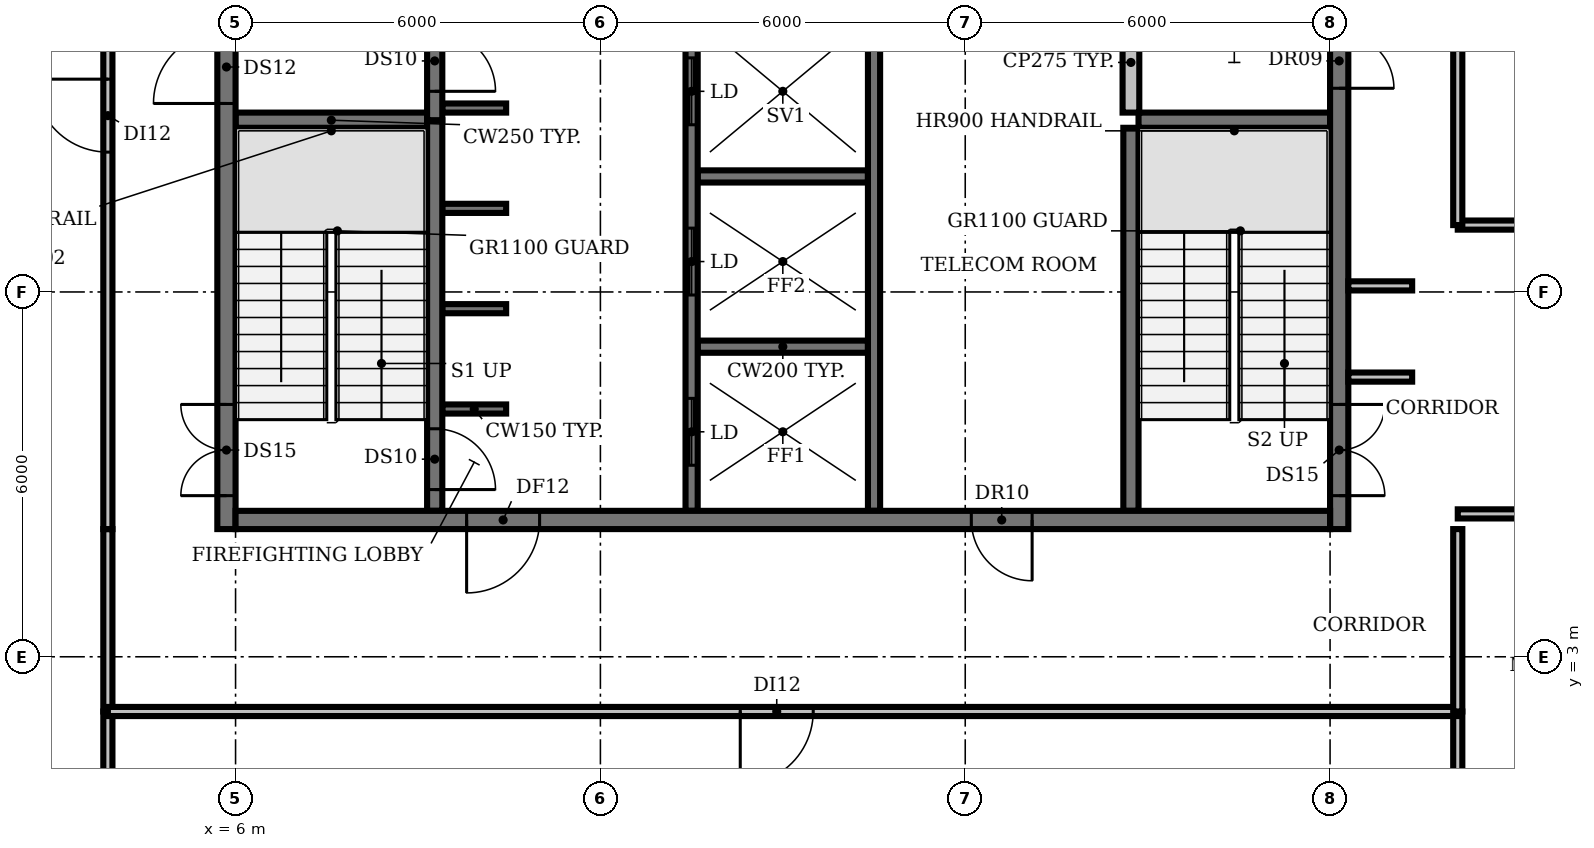
"""IFC4 building model, lengths in metres.
Left out: names, types, materials, properties, quantities, classifications, styles, units other than length and angle.
Written with IfcOpenShell. Run it as: python <this file> out.ifc"""

import sys

from ifc_helpers import new_model, si_unit, direction, frame, frame_2d, origin, place, context, subcontext, project, spatial, rectangle, extrude, element, fill, save


model = new_model("IFC4")
c1 = context("Model", 3, precision=1e-05, world=origin(), true_north=direction((0.0, 1.0)))
c2 = subcontext(c1, "Body", "Model", "MODEL_VIEW")
j1 = project(units=[si_unit("LENGTHUNIT", "METRE"), si_unit("PLANEANGLEUNIT", "RADIAN")], contexts=[c1])
p1 = place(None, origin())
s1 = spatial("IfcSite", under=j1, at=p1, CompositionType="ELEMENT")
p2 = place(p1, origin())
s2 = spatial("IfcBuilding", under=s1, at=p2, CompositionType="ELEMENT")
p3 = place(p2, frame((0.0, 0.0, 323.0)))
s3 = spatial("IfcBuildingStorey", under=s2, at=p3, CompositionType="ELEMENT", Elevation=323.0)
p4 = place(p3, frame((9.4, 7.075, 0.0), z_axis=(0.0, 0.0, 1.0), x_axis=(1.0, 0.0, 0.0)))
e1 = element("IfcWall", 1, at=p4, inside=s3, PredefinedType="SHEAR", context=c2, shape_type="SweptSolid", body=[
    extrude(rectangle(XDim=1.05, YDim=0.15, at=frame_2d((0.525, 0.0))), origin(), (0.0, 0.0, 1.0), 3.9),
])
p5 = place(p3, frame((13.6, 8.1, 0.0), z_axis=(0.0, 0.0, 1.0), x_axis=(1.0, 0.0, 0.0)))
e2 = element("IfcWall", 2, at=p5, inside=s3, PredefinedType="SHEAR", context=c2, shape_type="SweptSolid", body=[
    extrude(rectangle(XDim=2.8, YDim=0.2, at=frame_2d((1.4, 0.0))), origin(), (0.0, 0.0, 1.0), 3.9),
])
for number, where, z_axis, x_axis in (
    (3, (9.4, 8.725, 0.0), (0.0, 0.0, 1.0), (1.0, 0.0, 0.0)),
    (4, (9.4, 10.375, 0.0), (0.0, 0.0, 1.0), (1.0, 0.0, 0.0)),
):
    element("IfcWall", number, at=place(p3, frame(where, z_axis=z_axis, x_axis=x_axis)), inside=s3, PredefinedType="SHEAR", context=c2, shape_type="SweptSolid", body=[
        extrude(rectangle(XDim=1.05, YDim=0.15, at=frame_2d((0.525, 0.0))), origin(), (0.0, 0.0, 1.0), 3.9),
    ])
p6 = place(p3, frame((13.6, 10.9, 0.0), z_axis=(0.0, 0.0, 1.0), x_axis=(1.0, 0.0, 0.0)))
e5 = element("IfcWall", 5, at=p6, inside=s3, PredefinedType="SHEAR", context=c2, shape_type="SweptSolid", body=[
    extrude(rectangle(XDim=2.8, YDim=0.2, at=frame_2d((1.4, 0.0))), origin(), (0.0, 0.0, 1.0), 3.9),
])
for number, where, z_axis, x_axis in (
    (6, (6.0, 11.825, 0.0), (0.0, 0.0, 1.0), (1.0, 0.0, 0.0)),
    (7, (20.85, 11.825, 0.0), (0.0, 0.0, 1.0), (1.0, 0.0, 0.0)),
):
    element("IfcWall", number, at=place(p3, frame(where, z_axis=z_axis, x_axis=x_axis)), inside=s3, PredefinedType="SHEAR", context=c2, shape_type="SweptSolid", body=[
        extrude(rectangle(XDim=3.15, YDim=0.25, at=frame_2d((1.575, 0.0))), origin(), (0.0, 0.0, 1.0), 3.9),
    ])
p7 = place(p3, frame((9.4, 12.025, 0.0), z_axis=(0.0, 0.0, 1.0), x_axis=(1.0, 0.0, 0.0)))
e8 = element("IfcWall", 8, at=p7, inside=s3, PredefinedType="SHEAR", context=c2, shape_type="SweptSolid", body=[
    extrude(rectangle(XDim=1.05, YDim=0.15, at=frame_2d((0.525, 0.0))), origin(), (0.0, 0.0, 1.0), 3.9),
])
p8 = place(p3, frame((9.275, 11.825, 0.0), z_axis=(0.0, 0.0, 1.0), x_axis=(0.0, -1.0, 0.0)))
e9 = element("IfcWall", 9, at=p8, inside=s3, PredefinedType="SHEAR", context=c2, shape_type="SweptSolid", body=[
    extrude(rectangle(XDim=6.425, YDim=0.25, at=frame_2d((3.212, 0.0))), origin(), (0.0, 0.0, 1.0), 3.9),
])
p9 = place(p8, frame((5.075, 0.0, 0.0)))
e10 = element("IfcOpeningElement", 10, at=p9, cuts=e9, PredefinedType="OPENING", context=c2, shape_type="SweptSolid", body=[
    extrude(rectangle(XDim=1.0, YDim=2.1, at=frame_2d((0.5, 1.05))), frame((0.0, 0.135, 0.0), z_axis=(0.0, -1.0, 0.0), x_axis=(1.0, 0.0, 0.0)), (0.0, 0.0, 1.0), 0.27),
])
p10 = place(p3, frame((9.275, 18.375, 0.0), z_axis=(0.0, 0.0, 1.0), x_axis=(0.0, -1.0, 0.0)))
e11 = element("IfcWall", 11, at=p10, inside=s3, PredefinedType="SHEAR", context=c2, shape_type="SweptSolid", body=[
    extrude(rectangle(XDim=6.55, YDim=0.25, at=frame_2d((3.275, 0.0))), origin(), (0.0, 0.0, 1.0), 3.9),
])
p11 = place(p10, frame((5.075, 0.0, 0.0)))
e12 = element("IfcOpeningElement", 12, at=p11, cuts=e11, PredefinedType="OPENING", context=c2, shape_type="SweptSolid", body=[
    extrude(rectangle(XDim=1.0, YDim=2.1, at=frame_2d((0.5, 1.05))), frame((0.0, 0.135, 0.0), z_axis=(0.0, -1.0, 0.0), x_axis=(1.0, 0.0, 0.0)), (0.0, 0.0, 1.0), 0.27),
])
p12 = place(p3, frame((13.5, 5.4, 0.0), z_axis=(0.0, 0.0, 1.0), x_axis=(0.0, 1.0, 0.0)))
e13 = element("IfcWall", 13, at=p12, inside=s3, PredefinedType="SHEAR", context=c2, shape_type="SweptSolid", body=[
    extrude(rectangle(XDim=8.2, YDim=0.2, at=frame_2d((4.1, 0.0))), origin(), (0.0, 0.0, 1.0), 3.9),
])
p13 = place(p12, frame((0.75, 0.0, 0.0)))
e14 = element("IfcOpeningElement", 14, at=p13, cuts=e13, PredefinedType="OPENING", context=c2, shape_type="SweptSolid", body=[
    extrude(rectangle(XDim=1.1, YDim=2.1, at=frame_2d((0.55, 1.05))), frame((0.0, 0.11, 0.0), z_axis=(0.0, -1.0, 0.0), x_axis=(1.0, 0.0, 0.0)), (0.0, 0.0, 1.0), 0.22),
])
p14 = place(p12, frame((3.55, 0.0, 0.0)))
e15 = element("IfcOpeningElement", 15, at=p14, cuts=e13, PredefinedType="OPENING", context=c2, shape_type="SweptSolid", body=[
    extrude(rectangle(XDim=1.1, YDim=2.1, at=frame_2d((0.55, 1.05))), frame((0.0, 0.11, 0.0), z_axis=(0.0, -1.0, 0.0), x_axis=(1.0, 0.0, 0.0)), (0.0, 0.0, 1.0), 0.22),
])
p15 = place(p12, frame((6.35, 0.0, 0.0)))
e16 = element("IfcOpeningElement", 16, at=p15, cuts=e13, PredefinedType="OPENING", context=c2, shape_type="SweptSolid", body=[
    extrude(rectangle(XDim=1.1, YDim=2.1, at=frame_2d((0.55, 1.05))), frame((0.0, 0.11, 0.0), z_axis=(0.0, -1.0, 0.0), x_axis=(1.0, 0.0, 0.0)), (0.0, 0.0, 1.0), 0.22),
])
p16 = place(p3, frame((16.5, 5.4, 0.0), z_axis=(0.0, 0.0, 1.0), x_axis=(0.0, 1.0, 0.0)))
e17 = element("IfcWall", 17, at=p16, inside=s3, PredefinedType="SHEAR", context=c2, shape_type="SweptSolid", body=[
    extrude(rectangle(XDim=8.2, YDim=0.2, at=frame_2d((4.1, 0.0))), origin(), (0.0, 0.0, 1.0), 3.9),
])
p17 = place(p3, frame((20.725, 5.4, 0.0), z_axis=(0.0, 0.0, 1.0), x_axis=(0.0, 1.0, 0.0)))
e18 = element("IfcWall", 18, at=p17, inside=s3, PredefinedType="SHEAR", context=c2, shape_type="SweptSolid", body=[
    extrude(rectangle(XDim=6.3, YDim=0.25, at=frame_2d((3.15, 0.0))), origin(), (0.0, 0.0, 1.0), 3.9),
])
p18 = place(p3, frame((20.725, 11.95, 0.0), z_axis=(0.0, 0.0, 1.0), x_axis=(0.0, 1.0, 0.0)))
e19 = element("IfcWall", 19, at=p18, inside=s3, PredefinedType="PARTITIONING", context=c2, shape_type="SweptSolid", body=[
    extrude(rectangle(XDim=1.65, YDim=0.275, at=frame_2d((0.825, 0.0))), origin(), (0.0, 0.0, 1.0), 3.9),
])
p19 = place(p3, frame((5.85, 5.1, 0.0), z_axis=(0.0, 0.0, 1.0), x_axis=(0.0, 1.0, 0.0)))
e20 = element("IfcWall", 20, at=p19, inside=s3, PredefinedType="SHEAR", context=c2, shape_type="SweptSolid", body=[
    extrude(rectangle(XDim=20.0, YDim=0.3, at=frame_2d((10.0, 0.0))), origin(), (0.0, 0.0, 1.0), 3.9),
])
p20 = place(p19, frame((0.55, 0.0, 0.0)))
e21 = element("IfcOpeningElement", 21, at=p20, cuts=e20, PredefinedType="OPENING", context=c2, shape_type="SweptSolid", body=[
    extrude(rectangle(XDim=1.5, YDim=2.1, at=frame_2d((0.75, 1.05))), frame((0.0, 0.16, 0.0), z_axis=(0.0, -1.0, 0.0), x_axis=(1.0, 0.0, 0.0)), (0.0, 0.0, 1.0), 0.32),
])
p21 = place(p19, frame((7.0, 0.0, 0.0)))
e22 = element("IfcOpeningElement", 22, at=p21, cuts=e20, PredefinedType="OPENING", context=c2, shape_type="SweptSolid", body=[
    extrude(rectangle(XDim=1.2, YDim=2.1, at=frame_2d((0.6, 1.05))), frame((0.0, 0.16, 0.0), z_axis=(0.0, -1.0, 0.0), x_axis=(1.0, 0.0, 0.0)), (0.0, 0.0, 1.0), 0.32),
])
p22 = place(p19, frame((13.55, 0.0, 0.0)))
e23 = element("IfcOpeningElement", 23, at=p22, cuts=e20, PredefinedType="OPENING", context=c2, shape_type="SweptSolid", body=[
    extrude(rectangle(XDim=1.2, YDim=2.1, at=frame_2d((0.6, 1.05))), frame((0.0, 0.16, 0.0), z_axis=(0.0, -1.0, 0.0), x_axis=(1.0, 0.0, 0.0)), (0.0, 0.0, 1.0), 0.32),
])
p23 = place(p3, frame((24.15, 25.705, 0.0), z_axis=(0.0, 0.0, 1.0), x_axis=(0.0, -1.0, 0.0)))
e24 = element("IfcWall", 24, at=p23, inside=s3, PredefinedType="SHEAR", context=c2, shape_type="SweptSolid", body=[
    extrude(rectangle(XDim=20.605, YDim=0.3, at=frame_2d((10.302, 0.0))), origin(), (0.0, 0.0, 1.0), 3.9),
])
p24 = place(p23, frame((18.555, 0.0, 0.0)))
e25 = element("IfcOpeningElement", 25, at=p24, cuts=e24, PredefinedType="OPENING", context=c2, shape_type="SweptSolid", body=[
    extrude(rectangle(XDim=1.5, YDim=2.1, at=frame_2d((0.75, 1.05))), frame((0.0, 0.16, 0.0), z_axis=(0.0, -1.0, 0.0), x_axis=(1.0, 0.0, 0.0)), (0.0, 0.0, 1.0), 0.32),
])
p25 = place(p23, frame((12.455, 0.0, 0.0)))
e26 = element("IfcOpeningElement", 26, at=p25, cuts=e24, PredefinedType="OPENING", context=c2, shape_type="SweptSolid", body=[
    extrude(rectangle(XDim=0.9, YDim=2.1, at=frame_2d((0.45, 1.05))), frame((0.0, 0.16, 0.0), z_axis=(0.0, -1.0, 0.0), x_axis=(1.0, 0.0, 0.0)), (0.0, 0.0, 1.0), 0.32),
])
p26 = place(p23, frame((6.455, 0.0, 0.0)))
e27 = element("IfcOpeningElement", 27, at=p26, cuts=e24, PredefinedType="OPENING", context=c2, shape_type="SweptSolid", body=[
    extrude(rectangle(XDim=2.0, YDim=2.1, at=frame_2d((1.0, 1.05))), frame((0.0, 0.16, 0.0), z_axis=(0.0, -1.0, 0.0), x_axis=(1.0, 0.0, 0.0)), (0.0, 0.0, 1.0), 0.32),
])
p27 = place(p3, frame((24.0, 5.25, 0.0), z_axis=(0.0, 0.0, 1.0), x_axis=(-1.0, 0.0, 0.0)))
e28 = element("IfcWall", 28, at=p27, inside=s3, PredefinedType="SHEAR", context=c2, shape_type="SweptSolid", body=[
    extrude(rectangle(XDim=18.0, YDim=0.3, at=frame_2d((9.0, 0.0))), origin(), (0.0, 0.0, 1.0), 3.9),
])
p28 = place(p27, frame((13.0, 0.0, 0.0)))
e29 = element("IfcOpeningElement", 29, at=p28, cuts=e28, PredefinedType="OPENING", context=c2, shape_type="SweptSolid", body=[
    extrude(rectangle(XDim=1.2, YDim=2.1, at=frame_2d((0.6, 1.05))), frame((0.0, 0.16, 0.0), z_axis=(0.0, -1.0, 0.0), x_axis=(1.0, 0.0, 0.0)), (0.0, 0.0, 1.0), 0.32),
])
p29 = place(p27, frame((4.9, 0.0, 0.0)))
e30 = element("IfcOpeningElement", 30, at=p29, cuts=e28, PredefinedType="OPENING", context=c2, shape_type="SweptSolid", body=[
    extrude(rectangle(XDim=1.0, YDim=2.1, at=frame_2d((0.5, 1.05))), frame((0.0, 0.16, 0.0), z_axis=(0.0, -1.0, 0.0), x_axis=(1.0, 0.0, 0.0)), (0.0, 0.0, 1.0), 0.32),
])
p30 = place(p3, frame((3.9, -3.29, 0.0), z_axis=(0.0, 0.0, 1.0), x_axis=(0.0, 1.0, 0.0)))
e31 = element("IfcWall", 31, at=p30, inside=s3, PredefinedType="PARTITIONING", context=c2, shape_type="SweptSolid", body=[
    extrude(rectangle(XDim=5.39, YDim=0.15, at=frame_2d((2.695, 0.0))), origin(), (0.0, 0.0, 1.0), 2.48),
])
p31 = place(p3, frame((3.9, 2.1, 0.0), z_axis=(0.0, 0.0, 1.0), x_axis=(0.0, 1.0, 0.0)))
e32 = element("IfcWall", 32, at=p31, inside=s3, PredefinedType="PARTITIONING", context=c2, shape_type="SweptSolid", body=[
    extrude(rectangle(XDim=3.0, YDim=0.15, at=frame_2d((1.5, 0.0))), origin(), (0.0, 0.0, 1.0), 2.48),
])
p32 = place(p3, frame((3.9, 5.1, 0.0), z_axis=(0.0, 0.0, 1.0), x_axis=(0.0, 1.0, 0.0)))
e33 = element("IfcWall", 33, at=p32, inside=s3, PredefinedType="PARTITIONING", context=c2, shape_type="SweptSolid", body=[
    extrude(rectangle(XDim=13.9, YDim=0.15, at=frame_2d((6.95, 0.0))), origin(), (0.0, 0.0, 1.0), 2.48),
])
p33 = place(p32, frame((6.2, 0.0, 0.0)))
e34 = element("IfcOpeningElement", 34, at=p33, cuts=e33, PredefinedType="OPENING", context=c2, shape_type="SweptSolid", body=[
    extrude(rectangle(XDim=1.2, YDim=2.1, at=frame_2d((0.6, 1.05))), frame((0.0, 0.085, 0.0), z_axis=(0.0, -1.0, 0.0), x_axis=(1.0, 0.0, 0.0)), (0.0, 0.0, 1.0), 0.17),
])
for number, where, z_axis, x_axis in (
    (35, (24.3, 7.6, 0.0), (0.0, 0.0, 1.0), (1.0, 0.0, 0.0)),
    (36, (24.3, 9.1, 0.0), (0.0, 0.0, 1.0), (1.0, 0.0, 0.0)),
):
    element("IfcWall", number, at=place(p3, frame(where, z_axis=z_axis, x_axis=x_axis)), inside=s3, PredefinedType="PARTITIONING", context=c2, shape_type="SweptSolid", body=[
        extrude(rectangle(XDim=1.05, YDim=0.15, at=frame_2d((0.525, 0.0))), origin(), (0.0, 0.0, 1.0), 2.48),
    ])
p34 = place(p3, frame((26.1, -3.96, 0.0), z_axis=(0.0, 0.0, 1.0), x_axis=(0.0, 1.0, 0.0)))
e37 = element("IfcWall", 37, at=p34, inside=s3, PredefinedType="PARTITIONING", context=c2, shape_type="SweptSolid", body=[
    extrude(rectangle(XDim=6.06, YDim=0.15, at=frame_2d((3.03, 0.0))), origin(), (0.0, 0.0, 1.0), 2.48),
])
p35 = place(p3, frame((26.1, 2.1, 0.0), z_axis=(0.0, 0.0, 1.0), x_axis=(-1.0, 0.0, 0.0)))
e38 = element("IfcWall", 38, at=p35, inside=s3, PredefinedType="PARTITIONING", context=c2, shape_type="SweptSolid", body=[
    extrude(rectangle(XDim=22.2, YDim=0.15, at=frame_2d((11.1, 0.0))), origin(), (0.0, 0.0, 1.0), 2.48),
])
p36 = place(p35, frame((10.6, 0.0, 0.0)))
e39 = element("IfcOpeningElement", 39, at=p36, cuts=e38, PredefinedType="OPENING", context=c2, shape_type="SweptSolid", body=[
    extrude(rectangle(XDim=1.2, YDim=2.1, at=frame_2d((0.6, 1.05))), frame((0.0, 0.085, 0.0), z_axis=(0.0, -1.0, 0.0), x_axis=(1.0, 0.0, 0.0)), (0.0, 0.0, 1.0), 0.17),
])
p37 = place(p3, frame((26.1, 2.1, 0.0), z_axis=(0.0, 0.0, 1.0), x_axis=(0.0, 1.0, 0.0)))
e40 = element("IfcWall", 40, at=p37, inside=s3, PredefinedType="PARTITIONING", context=c2, shape_type="SweptSolid", body=[
    extrude(rectangle(XDim=3.0, YDim=0.15, at=frame_2d((1.5, 0.0))), origin(), (0.0, 0.0, 1.0), 2.48),
])
p38 = place(p3, frame((26.1, 10.1, 0.0), z_axis=(0.0, 0.0, 1.0), x_axis=(1.0, 0.0, 0.0)))
e41 = element("IfcWall", 41, at=p38, inside=s3, PredefinedType="PARTITIONING", context=c2, shape_type="SweptSolid", body=[
    extrude(rectangle(XDim=1.11, YDim=0.15, at=frame_2d((0.555, 0.0))), origin(), (0.0, 0.0, 1.0), 2.48),
])
p39 = place(p3, frame((26.1, 19.924, 0.0), z_axis=(0.0, 0.0, 1.0), x_axis=(0.0, -1.0, 0.0)))
e42 = element("IfcWall", 42, at=p39, inside=s3, PredefinedType="PARTITIONING", context=c2, shape_type="SweptSolid", body=[
    extrude(rectangle(XDim=9.823, YDim=0.15, at=frame_2d((4.912, 0.0))), origin(), (0.0, 0.0, 1.0), 2.48),
])
p40 = place(p39, frame((4.724, 0.0, 0.0)))
e43 = element("IfcOpeningElement", 43, at=p40, cuts=e42, PredefinedType="OPENING", context=c2, shape_type="SweptSolid", body=[
    extrude(rectangle(XDim=1.0, YDim=2.1, at=frame_2d((0.5, 1.05))), frame((0.0, 0.085, 0.0), z_axis=(0.0, -1.0, 0.0), x_axis=(1.0, 0.0, 0.0)), (0.0, 0.0, 1.0), 0.17),
])
p41 = place(p3, frame((31.75, 5.35, 0.0), z_axis=(0.0, 0.0, 1.0), x_axis=(-1.0, 0.0, 0.0)))
e44 = element("IfcWall", 44, at=p41, inside=s3, PredefinedType="PARTITIONING", context=c2, shape_type="SweptSolid", body=[
    extrude(rectangle(XDim=5.65, YDim=0.15, at=frame_2d((2.825, 0.0))), origin(), (0.0, 0.0, 1.0), 2.48),
])
p42 = place(p41, frame((2.95, 0.0, 0.0)))
e45 = element("IfcOpeningElement", 45, at=p42, cuts=e44, PredefinedType="OPENING", context=c2, shape_type="SweptSolid", body=[
    extrude(rectangle(XDim=1.0, YDim=2.1, at=frame_2d((0.5, 1.05))), frame((0.0, 0.085, 0.0), z_axis=(0.0, -1.0, 0.0), x_axis=(1.0, 0.0, 0.0)), (0.0, 0.0, 1.0), 0.17),
])
p43 = place(p9, origin())
e46 = element("IfcDoor", 46, at=p43, inside=s3, OperationType="SINGLE_SWING_RIGHT", PredefinedType="DOOR", context=c2, shape_type="SweptSolid", body=[
    extrude(rectangle(XDim=1.0, YDim=2.1, at=frame_2d((0.5, 1.05))), frame((0.0, 0.025, 0.0), z_axis=(0.0, -1.0, 0.0), x_axis=(1.0, 0.0, 0.0)), (0.0, 0.0, 1.0), 0.05),
])
fill(e10, e46)
p44 = place(p11, origin())
e47 = element("IfcDoor", 47, at=p44, inside=s3, OperationType="SINGLE_SWING_RIGHT", PredefinedType="DOOR", context=c2, shape_type="SweptSolid", body=[
    extrude(rectangle(XDim=1.0, YDim=2.1, at=frame_2d((0.5, 1.05))), frame((0.0, 0.025, 0.0), z_axis=(0.0, -1.0, 0.0), x_axis=(1.0, 0.0, 0.0)), (0.0, 0.0, 1.0), 0.05),
])
fill(e12, e47)
p45 = place(p13, origin())
e48 = element("IfcDoor", 48, at=p45, inside=s3, OperationType="DOUBLE_DOOR_SLIDING", PredefinedType="DOOR", context=c2, shape_type="SweptSolid", body=[
    extrude(rectangle(XDim=1.1, YDim=2.1, at=frame_2d((0.55, 1.05))), frame((0.0, 0.025, 0.0), z_axis=(0.0, -1.0, 0.0), x_axis=(1.0, 0.0, 0.0)), (0.0, 0.0, 1.0), 0.05),
])
fill(e14, e48)
p46 = place(p14, origin())
e49 = element("IfcDoor", 49, at=p46, inside=s3, OperationType="DOUBLE_DOOR_SLIDING", PredefinedType="DOOR", context=c2, shape_type="SweptSolid", body=[
    extrude(rectangle(XDim=1.1, YDim=2.1, at=frame_2d((0.55, 1.05))), frame((0.0, 0.025, 0.0), z_axis=(0.0, -1.0, 0.0), x_axis=(1.0, 0.0, 0.0)), (0.0, 0.0, 1.0), 0.05),
])
fill(e15, e49)
p47 = place(p15, origin())
e50 = element("IfcDoor", 50, at=p47, inside=s3, OperationType="DOUBLE_DOOR_SLIDING", PredefinedType="DOOR", context=c2, shape_type="SweptSolid", body=[
    extrude(rectangle(XDim=1.1, YDim=2.1, at=frame_2d((0.55, 1.05))), frame((0.0, 0.025, 0.0), z_axis=(0.0, -1.0, 0.0), x_axis=(1.0, 0.0, 0.0)), (0.0, 0.0, 1.0), 0.05),
])
fill(e16, e50)
p48 = place(p20, origin())
e51 = element("IfcDoor", 51, at=p48, inside=s3, OperationType="DOUBLE_DOOR_SINGLE_SWING", PredefinedType="DOOR", context=c2, shape_type="SweptSolid", body=[
    extrude(rectangle(XDim=1.5, YDim=2.1, at=frame_2d((0.75, 1.05))), frame((0.0, 0.025, 0.0), z_axis=(0.0, -1.0, 0.0), x_axis=(1.0, 0.0, 0.0)), (0.0, 0.0, 1.0), 0.05),
])
fill(e21, e51)
p49 = place(p21, origin())
e52 = element("IfcDoor", 52, at=p49, inside=s3, OperationType="SINGLE_SWING_LEFT", PredefinedType="DOOR", context=c2, shape_type="SweptSolid", body=[
    extrude(rectangle(XDim=1.2, YDim=2.1, at=frame_2d((0.6, 1.05))), frame((0.0, 0.025, 0.0), z_axis=(0.0, -1.0, 0.0), x_axis=(1.0, 0.0, 0.0)), (0.0, 0.0, 1.0), 0.05),
])
fill(e22, e52)
p50 = place(p24, origin())
e53 = element("IfcDoor", 53, at=p50, inside=s3, OperationType="DOUBLE_DOOR_SINGLE_SWING", PredefinedType="DOOR", context=c2, shape_type="SweptSolid", body=[
    extrude(rectangle(XDim=1.5, YDim=2.1, at=frame_2d((0.75, 1.05))), frame((0.0, 0.025, 0.0), z_axis=(0.0, -1.0, 0.0), x_axis=(1.0, 0.0, 0.0)), (0.0, 0.0, 1.0), 0.05),
])
fill(e25, e53)
p51 = place(p25, origin())
e54 = element("IfcDoor", 54, at=p51, inside=s3, OperationType="SINGLE_SWING_RIGHT", PredefinedType="DOOR", context=c2, shape_type="SweptSolid", body=[
    extrude(rectangle(XDim=0.9, YDim=2.1, at=frame_2d((0.45, 1.05))), frame((0.0, 0.025, 0.0), z_axis=(0.0, -1.0, 0.0), x_axis=(1.0, 0.0, 0.0)), (0.0, 0.0, 1.0), 0.05),
])
fill(e26, e54)
p52 = place(p28, origin())
e55 = element("IfcDoor", 55, at=p52, inside=s3, OperationType="SINGLE_SWING_RIGHT", PredefinedType="DOOR", context=c2, shape_type="SweptSolid", body=[
    extrude(rectangle(XDim=1.2, YDim=2.1, at=frame_2d((0.6, 1.05))), frame((0.0, 0.025, 0.0), z_axis=(0.0, -1.0, 0.0), x_axis=(1.0, 0.0, 0.0)), (0.0, 0.0, 1.0), 0.05),
])
fill(e29, e55)
p53 = place(p29, origin())
e56 = element("IfcDoor", 56, at=p53, inside=s3, OperationType="SINGLE_SWING_LEFT", PredefinedType="DOOR", context=c2, shape_type="SweptSolid", body=[
    extrude(rectangle(XDim=1.0, YDim=2.1, at=frame_2d((0.5, 1.05))), frame((0.0, 0.025, 0.0), z_axis=(0.0, -1.0, 0.0), x_axis=(1.0, 0.0, 0.0)), (0.0, 0.0, 1.0), 0.05),
])
fill(e30, e56)
p54 = place(p33, origin())
e57 = element("IfcDoor", 57, at=p54, inside=s3, OperationType="SINGLE_SWING_RIGHT", PredefinedType="DOOR", context=c2, shape_type="SweptSolid", body=[
    extrude(rectangle(XDim=1.2, YDim=2.1, at=frame_2d((0.6, 1.05))), frame((0.0, 0.025, 0.0), z_axis=(0.0, -1.0, 0.0), x_axis=(1.0, 0.0, 0.0)), (0.0, 0.0, 1.0), 0.05),
])
fill(e34, e57)
p55 = place(p36, origin())
e58 = element("IfcDoor", 58, at=p55, inside=s3, OperationType="SINGLE_SWING_RIGHT", PredefinedType="DOOR", context=c2, shape_type="SweptSolid", body=[
    extrude(rectangle(XDim=1.2, YDim=2.1, at=frame_2d((0.6, 1.05))), frame((0.0, 0.025, 0.0), z_axis=(0.0, -1.0, 0.0), x_axis=(1.0, 0.0, 0.0)), (0.0, 0.0, 1.0), 0.05),
])
fill(e39, e58)
save(model, sys.argv[1])
